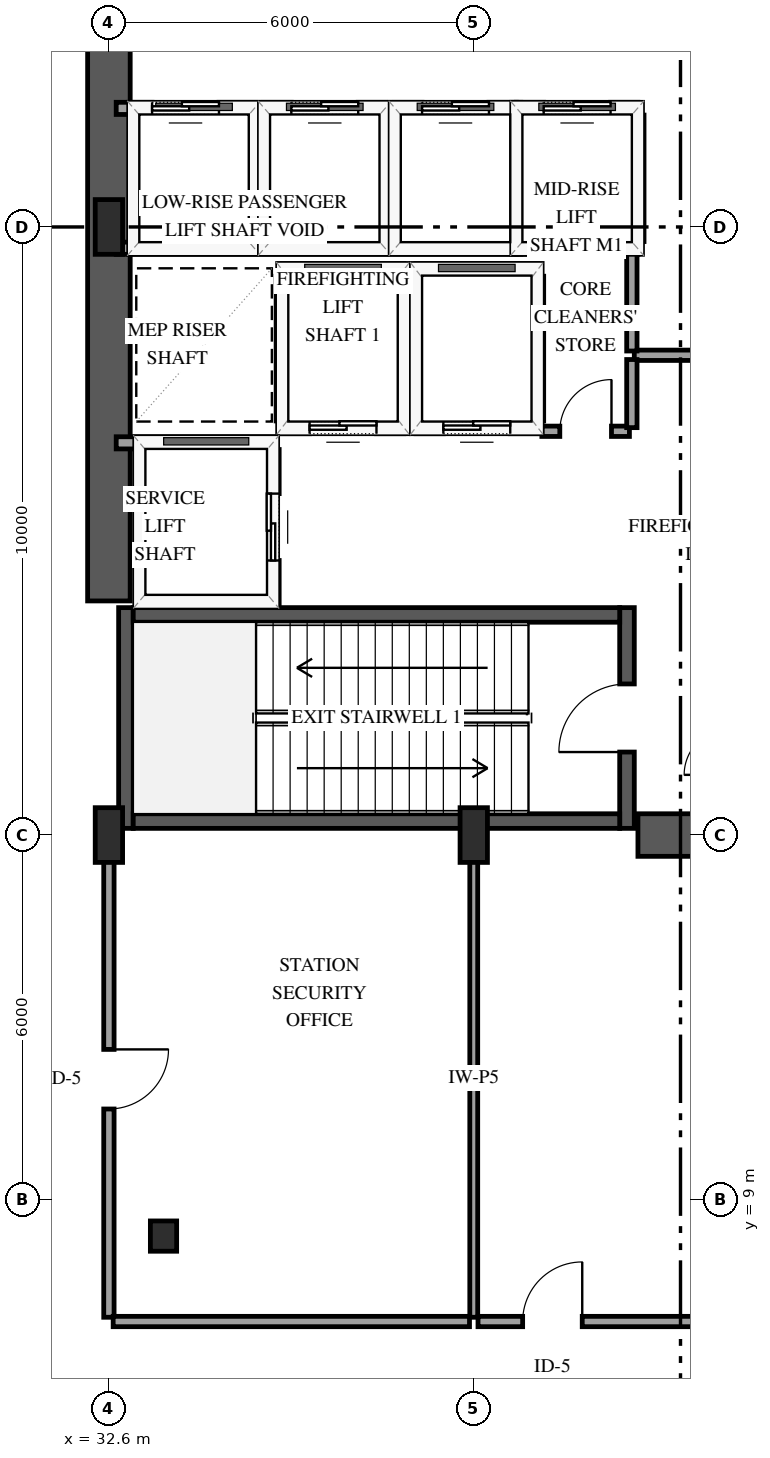
"""IFC4 building model, lengths in metres.
Left out: names, types, materials, properties, quantities, classifications, styles, units other than length and angle.
Written with IfcOpenShell. Run it as: python <this file> out.ifc"""

import sys

from ifc_helpers import new_model, si_unit, direction, frame, frame_2d, origin, origin_2d, place, context, subcontext, project, spatial, rectangle, i_section, extrude, element, fill, save


model = new_model("IFC4")
c1 = context("Model", 3, precision=1e-05, world=origin(), true_north=direction((0.0, 1.0)))
c2 = subcontext(c1, "Body", "Model", "MODEL_VIEW")
j1 = project(units=[si_unit("LENGTHUNIT", "METRE"), si_unit("PLANEANGLEUNIT", "RADIAN")], contexts=[c1])
p1 = place(None, origin())
s1 = spatial("IfcSite", under=j1, at=p1, CompositionType="ELEMENT")
p2 = place(p1, origin())
s2 = spatial("IfcBuilding", under=s1, at=p2, CompositionType="ELEMENT")
p3 = place(p2, origin())
s3 = spatial("IfcBuildingStorey", under=s2, at=p3, CompositionType="ELEMENT", Elevation=0.0)
p4 = place(p3, frame((32.88, 15.11, 0.0), z_axis=(0.0, 0.0, 1.0), x_axis=(0.0, 1.0, 0.0)))
e1 = element("IfcWall", 1, at=p4, inside=s3, PredefinedType="SHEAR", context=c2, shape_type="SweptSolid", body=[
    extrude(rectangle(XDim=3.63, YDim=0.24, at=frame_2d((1.815, 0.0))), origin(), (0.0, 0.0, 1.0), 6.0),
])
p5 = place(p3, frame((41.12, 15.11, 0.0), z_axis=(0.0, 0.0, 1.0), x_axis=(0.0, 1.0, 0.0)))
e2 = element("IfcWall", 2, at=p5, inside=s3, PredefinedType="SHEAR", context=c2, shape_type="SweptSolid", body=[
    extrude(rectangle(XDim=3.63, YDim=0.24, at=frame_2d((1.815, 0.0))), origin(), (0.0, 0.0, 1.0), 6.0),
])
p6 = place(p5, frame((1.255, 0.0, 0.0)))
e3 = element("IfcOpeningElement", 3, at=p6, cuts=e2, PredefinedType="OPENING", context=c2, shape_type="SweptSolid", body=[
    extrude(rectangle(XDim=1.12, YDim=2.15, at=frame_2d((0.56, 1.075))), frame((0.0, 0.13, 0.0), z_axis=(0.0, -1.0, 0.0), x_axis=(1.0, 0.0, 0.0)), (0.0, 0.0, 1.0), 0.26),
])
for number, where, z_axis, x_axis in (
    (4, (33.0, 15.23, 0.0), (0.0, 0.0, 1.0), (1.0, 0.0, 0.0)),
    (5, (33.0, 18.62, 0.0), (0.0, 0.0, 1.0), (1.0, 0.0, 0.0)),
):
    element("IfcWall", number, at=place(p3, frame(where, z_axis=z_axis, x_axis=x_axis)), inside=s3, PredefinedType="SHEAR", context=c2, shape_type="SweptSolid", body=[
        extrude(rectangle(XDim=8.0, YDim=0.24, at=frame_2d((4.0, 0.0))), origin(), (0.0, 0.0, 1.0), 6.0),
    ])
p7 = place(p3, frame((32.6, 18.85, 0.0), z_axis=(0.0, 0.0, 1.0), x_axis=(0.0, 1.0, 0.0)))
e6 = element("IfcWall", 6, at=p7, inside=s3, PredefinedType="SHEAR", context=c2, shape_type="SweptSolid", body=[
    extrude(rectangle(XDim=12.3, YDim=0.7, at=frame_2d((6.15, 0.0))), origin(), (0.0, 0.0, 1.0), 6.0),
])
p8 = place(p3, frame((41.3, 15.0, 0.0), z_axis=(0.0, 0.0, 1.0), x_axis=(1.0, 0.0, 0.0)))
e7 = element("IfcWall", 7, at=p8, inside=s3, PredefinedType="SHEAR", context=c2, shape_type="SweptSolid", body=[
    extrude(rectangle(XDim=2.85, YDim=0.7, at=frame_2d((1.425, 0.0))), origin(), (0.0, 0.0, 1.0), 6.0),
])
for number, where, z_axis, x_axis in (
    (8, (32.6, 15.0, 0.0), (0.0, 0.0, 1.0), (1.0, 0.0, 0.0)),
    (9, (32.6, 25.0, 0.0), (0.0, 0.0, 1.0), (1.0, 0.0, 0.0)),
    (10, (38.6, 15.0, 0.0), (0.0, 0.0, 1.0), (1.0, 0.0, 0.0)),
):
    element("IfcColumn", number, at=place(p3, frame(where, z_axis=z_axis, x_axis=x_axis)), inside=s3, PredefinedType="PILASTER", context=c2, shape_type="SweptSolid", body=[
        extrude(rectangle(XDim=0.45, YDim=0.9, at=origin_2d()), origin(), (0.0, 0.0, 1.0), 6.0),
    ])
p9 = place(p3, frame((33.498, 8.405, 0.0), z_axis=(0.0, 0.0, 1.0), x_axis=(1.0, 0.0, 0.0)))
e11 = element("IfcColumn", 11, at=p9, inside=s3, PredefinedType="COLUMN", context=c2, shape_type="SweptSolid", body=[
    extrude(i_section(OverallWidth=0.432, OverallDepth=0.498, WebThickness=0.056, FlangeThickness=0.089, FilletRadius=0.038, at=origin_2d()), origin(), (0.0, 0.0, 1.0), 6.0),
])
p10 = place(p3, frame((35.45, 21.7, 0.0), z_axis=(0.0, 0.0, 1.0), x_axis=(1.0, 0.0, 0.0)))
e12 = element("IfcWall", 12, at=p10, inside=s3, PredefinedType="SOLIDWALL", context=c2, shape_type="SweptSolid", body=[
    extrude(rectangle(XDim=2.0, YDim=0.2, at=frame_2d((1.0, 0.0))), origin(), (0.0, 0.0, 1.0), 5.68),
])
p11 = place(p10, frame((0.45, 0.0, 0.0)))
e13 = element("IfcOpeningElement", 13, at=p11, cuts=e12, PredefinedType="OPENING", context=c2, shape_type="SweptSolid", body=[
    extrude(rectangle(XDim=1.1, YDim=2.15, at=frame_2d((0.55, 1.075))), frame((0.0, 0.11, 0.0), z_axis=(0.0, -1.0, 0.0), x_axis=(1.0, 0.0, 0.0)), (0.0, 0.0, 1.0), 0.22),
])
p12 = place(p3, frame((35.45, 24.3, 0.0), z_axis=(0.0, 0.0, 1.0), x_axis=(1.0, 0.0, 0.0)))
e14 = element("IfcWall", 14, at=p12, inside=s3, PredefinedType="SOLIDWALL", context=c2, shape_type="SweptSolid", body=[
    extrude(rectangle(XDim=2.0, YDim=0.2, at=frame_2d((1.0, 0.0))), origin(), (0.0, 0.0, 1.0), 5.68),
])
for number, where, z_axis, x_axis in (
    (15, (35.45, 21.81, 0.0), (0.0, 0.0, 1.0), (0.0, 1.0, 0.0)),
    (16, (37.45, 21.81, 0.0), (0.0, 0.0, 1.0), (0.0, 1.0, 0.0)),
):
    element("IfcWall", number, at=place(p3, frame(where, z_axis=z_axis, x_axis=x_axis)), inside=s3, PredefinedType="SOLIDWALL", context=c2, shape_type="SweptSolid", body=[
        extrude(rectangle(XDim=2.38, YDim=0.2, at=frame_2d((1.19, 0.0))), origin(), (0.0, 0.0, 1.0), 5.68),
    ])
p13 = place(p3, frame((37.65, 21.7, 0.0), z_axis=(0.0, 0.0, 1.0), x_axis=(1.0, 0.0, 0.0)))
e17 = element("IfcWall", 17, at=p13, inside=s3, PredefinedType="SOLIDWALL", context=c2, shape_type="SweptSolid", body=[
    extrude(rectangle(XDim=2.0, YDim=0.2, at=frame_2d((1.0, 0.0))), origin(), (0.0, 0.0, 1.0), 5.68),
])
p14 = place(p13, frame((0.45, 0.0, 0.0)))
e18 = element("IfcOpeningElement", 18, at=p14, cuts=e17, PredefinedType="OPENING", context=c2, shape_type="SweptSolid", body=[
    extrude(rectangle(XDim=1.1, YDim=2.15, at=frame_2d((0.55, 1.075))), frame((0.0, 0.11, 0.0), z_axis=(0.0, -1.0, 0.0), x_axis=(1.0, 0.0, 0.0)), (0.0, 0.0, 1.0), 0.22),
])
p15 = place(p3, frame((37.65, 24.3, 0.0), z_axis=(0.0, 0.0, 1.0), x_axis=(1.0, 0.0, 0.0)))
e19 = element("IfcWall", 19, at=p15, inside=s3, PredefinedType="SOLIDWALL", context=c2, shape_type="SweptSolid", body=[
    extrude(rectangle(XDim=2.0, YDim=0.2, at=frame_2d((1.0, 0.0))), origin(), (0.0, 0.0, 1.0), 5.68),
])
p16 = place(p3, frame((39.65, 21.81, 0.0), z_axis=(0.0, 0.0, 1.0), x_axis=(0.0, 1.0, 0.0)))
e20 = element("IfcWall", 20, at=p16, inside=s3, PredefinedType="SOLIDWALL", context=c2, shape_type="SweptSolid", body=[
    extrude(rectangle(XDim=2.38, YDim=0.2, at=frame_2d((1.19, 0.0))), origin(), (0.0, 0.0, 1.0), 5.68),
])
p17 = place(p3, frame((32.72, 21.45, 0.0), z_axis=(0.0, 0.0, 1.0), x_axis=(1.0, 0.0, 0.0)))
e21 = element("IfcWall", 21, at=p17, inside=s3, PredefinedType="SOLIDWALL", context=c2, shape_type="SweptSolid", body=[
    extrude(rectangle(XDim=2.58, YDim=0.2, at=frame_2d((1.29, 0.0))), origin(), (0.0, 0.0, 1.0), 5.68),
])
p18 = place(p3, frame((35.3, 18.79, 0.0), z_axis=(0.0, 0.0, 1.0), x_axis=(0.0, 1.0, 0.0)))
e22 = element("IfcWall", 22, at=p18, inside=s3, PredefinedType="SOLIDWALL", context=c2, shape_type="SweptSolid", body=[
    extrude(rectangle(XDim=2.55, YDim=0.2, at=frame_2d((1.275, 0.0))), origin(), (0.0, 0.0, 1.0), 5.68),
])
p19 = place(p18, frame((0.725, 0.0, 0.0)))
e23 = element("IfcOpeningElement", 23, at=p19, cuts=e22, PredefinedType="OPENING", context=c2, shape_type="SweptSolid", body=[
    extrude(rectangle(XDim=1.1, YDim=2.15, at=frame_2d((0.55, 1.075))), frame((0.0, 0.11, 0.0), z_axis=(0.0, -1.0, 0.0), x_axis=(1.0, 0.0, 0.0)), (0.0, 0.0, 1.0), 0.22),
])
p20 = place(p3, frame((32.72, 24.65, 0.0), z_axis=(0.0, 0.0, 1.0), x_axis=(1.0, 0.0, 0.0)))
e24 = element("IfcWall", 24, at=p20, inside=s3, PredefinedType="SOLIDWALL", context=c2, shape_type="SweptSolid", body=[
    extrude(rectangle(XDim=2.28, YDim=0.2, at=frame_2d((1.14, 0.0))), origin(), (0.0, 0.0, 1.0), 5.68),
])
p21 = place(p3, frame((32.72, 26.95, 0.0), z_axis=(0.0, 0.0, 1.0), x_axis=(1.0, 0.0, 0.0)))
e25 = element("IfcWall", 25, at=p21, inside=s3, PredefinedType="SOLIDWALL", context=c2, shape_type="SweptSolid", body=[
    extrude(rectangle(XDim=2.28, YDim=0.2, at=frame_2d((1.14, 0.0))), origin(), (0.0, 0.0, 1.0), 5.68),
])
p22 = place(p21, frame((0.59, 0.0, 0.0)))
e26 = element("IfcOpeningElement", 26, at=p22, cuts=e25, PredefinedType="OPENING", context=c2, shape_type="SweptSolid", body=[
    extrude(rectangle(XDim=1.1, YDim=2.15, at=frame_2d((0.55, 1.075))), frame((0.0, 0.11, 0.0), z_axis=(0.0, -1.0, 0.0), x_axis=(1.0, 0.0, 0.0)), (0.0, 0.0, 1.0), 0.22),
])
p23 = place(p3, frame((35.0, 24.76, 0.0), z_axis=(0.0, 0.0, 1.0), x_axis=(0.0, 1.0, 0.0)))
e27 = element("IfcWall", 27, at=p23, inside=s3, PredefinedType="SOLIDWALL", context=c2, shape_type="SweptSolid", body=[
    extrude(rectangle(XDim=2.08, YDim=0.2, at=frame_2d((1.04, 0.0))), origin(), (0.0, 0.0, 1.0), 5.68),
])
p24 = place(p3, frame((35.15, 24.65, 0.0), z_axis=(0.0, 0.0, 1.0), x_axis=(1.0, 0.0, 0.0)))
e28 = element("IfcWall", 28, at=p24, inside=s3, PredefinedType="SOLIDWALL", context=c2, shape_type="SweptSolid", body=[
    extrude(rectangle(XDim=2.0, YDim=0.2, at=frame_2d((1.0, 0.0))), origin(), (0.0, 0.0, 1.0), 5.68),
])
p25 = place(p3, frame((35.15, 26.95, 0.0), z_axis=(0.0, 0.0, 1.0), x_axis=(1.0, 0.0, 0.0)))
e29 = element("IfcWall", 29, at=p25, inside=s3, PredefinedType="SOLIDWALL", context=c2, shape_type="SweptSolid", body=[
    extrude(rectangle(XDim=2.0, YDim=0.2, at=frame_2d((1.0, 0.0))), origin(), (0.0, 0.0, 1.0), 5.68),
])
p26 = place(p25, frame((0.45, 0.0, 0.0)))
e30 = element("IfcOpeningElement", 30, at=p26, cuts=e29, PredefinedType="OPENING", context=c2, shape_type="SweptSolid", body=[
    extrude(rectangle(XDim=1.1, YDim=2.15, at=frame_2d((0.55, 1.075))), frame((0.0, 0.11, 0.0), z_axis=(0.0, -1.0, 0.0), x_axis=(1.0, 0.0, 0.0)), (0.0, 0.0, 1.0), 0.22),
])
p27 = place(p3, frame((37.15, 24.76, 0.0), z_axis=(0.0, 0.0, 1.0), x_axis=(0.0, 1.0, 0.0)))
e31 = element("IfcWall", 31, at=p27, inside=s3, PredefinedType="SOLIDWALL", context=c2, shape_type="SweptSolid", body=[
    extrude(rectangle(XDim=2.08, YDim=0.2, at=frame_2d((1.04, 0.0))), origin(), (0.0, 0.0, 1.0), 5.68),
])
p28 = place(p3, frame((37.3, 24.65, 0.0), z_axis=(0.0, 0.0, 1.0), x_axis=(1.0, 0.0, 0.0)))
e32 = element("IfcWall", 32, at=p28, inside=s3, PredefinedType="SOLIDWALL", context=c2, shape_type="SweptSolid", body=[
    extrude(rectangle(XDim=2.0, YDim=0.2, at=frame_2d((1.0, 0.0))), origin(), (0.0, 0.0, 1.0), 5.68),
])
p29 = place(p3, frame((37.3, 26.95, 0.0), z_axis=(0.0, 0.0, 1.0), x_axis=(1.0, 0.0, 0.0)))
e33 = element("IfcWall", 33, at=p29, inside=s3, PredefinedType="SOLIDWALL", context=c2, shape_type="SweptSolid", body=[
    extrude(rectangle(XDim=2.0, YDim=0.2, at=frame_2d((1.0, 0.0))), origin(), (0.0, 0.0, 1.0), 5.68),
])
p30 = place(p29, frame((0.45, 0.0, 0.0)))
e34 = element("IfcOpeningElement", 34, at=p30, cuts=e33, PredefinedType="OPENING", context=c2, shape_type="SweptSolid", body=[
    extrude(rectangle(XDim=1.1, YDim=2.15, at=frame_2d((0.55, 1.075))), frame((0.0, 0.11, 0.0), z_axis=(0.0, -1.0, 0.0), x_axis=(1.0, 0.0, 0.0)), (0.0, 0.0, 1.0), 0.22),
])
p31 = place(p3, frame((39.3, 24.76, 0.0), z_axis=(0.0, 0.0, 1.0), x_axis=(0.0, 1.0, 0.0)))
e35 = element("IfcWall", 35, at=p31, inside=s3, PredefinedType="SOLIDWALL", context=c2, shape_type="SweptSolid", body=[
    extrude(rectangle(XDim=2.08, YDim=0.2, at=frame_2d((1.04, 0.0))), origin(), (0.0, 0.0, 1.0), 5.68),
])
p32 = place(p3, frame((39.3, 24.65, 0.0), z_axis=(0.0, 0.0, 1.0), x_axis=(1.0, 0.0, 0.0)))
e36 = element("IfcWall", 36, at=p32, inside=s3, PredefinedType="SOLIDWALL", context=c2, shape_type="SweptSolid", body=[
    extrude(rectangle(XDim=2.0, YDim=0.2, at=frame_2d((1.0, 0.0))), origin(), (0.0, 0.0, 1.0), 5.68),
])
p33 = place(p3, frame((39.3, 26.95, 0.0), z_axis=(0.0, 0.0, 1.0), x_axis=(1.0, 0.0, 0.0)))
e37 = element("IfcWall", 37, at=p33, inside=s3, PredefinedType="SOLIDWALL", context=c2, shape_type="SweptSolid", body=[
    extrude(rectangle(XDim=2.0, YDim=0.2, at=frame_2d((1.0, 0.0))), origin(), (0.0, 0.0, 1.0), 5.68),
])
p34 = place(p33, frame((0.45, 0.0, 0.0)))
e38 = element("IfcOpeningElement", 38, at=p34, cuts=e37, PredefinedType="OPENING", context=c2, shape_type="SweptSolid", body=[
    extrude(rectangle(XDim=1.1, YDim=2.15, at=frame_2d((0.55, 1.075))), frame((0.0, 0.11, 0.0), z_axis=(0.0, -1.0, 0.0), x_axis=(1.0, 0.0, 0.0)), (0.0, 0.0, 1.0), 0.22),
])
p35 = place(p3, frame((41.3, 24.76, 0.0), z_axis=(0.0, 0.0, 1.0), x_axis=(0.0, 1.0, 0.0)))
e39 = element("IfcWall", 39, at=p35, inside=s3, PredefinedType="SOLIDWALL", context=c2, shape_type="SweptSolid", body=[
    extrude(rectangle(XDim=2.08, YDim=0.2, at=frame_2d((1.04, 0.0))), origin(), (0.0, 0.0, 1.0), 5.68),
])
p36 = place(p3, frame((38.67, 7.0, 0.0), z_axis=(0.0, 0.0, 1.0), x_axis=(1.0, 0.0, 0.0)))
e40 = element("IfcWall", 40, at=p36, inside=s3, PredefinedType="PARTITIONING", context=c2, shape_type="SweptSolid", body=[
    extrude(rectangle(XDim=8.06, YDim=0.17, at=frame_2d((4.03, 0.0))), origin(), (0.0, 0.0, 1.0), 5.68),
])
p37 = place(p36, frame((0.734, 0.0, 0.0)))
e41 = element("IfcOpeningElement", 41, at=p37, cuts=e40, PredefinedType="OPENING", context=c2, shape_type="SweptSolid", body=[
    extrude(rectangle(XDim=0.98, YDim=2.15, at=frame_2d((0.49, 1.075))), frame((0.0, 0.095, 0.0), z_axis=(0.0, -1.0, 0.0), x_axis=(1.0, 0.0, 0.0)), (0.0, 0.0, 1.0), 0.19),
])
p38 = place(p3, frame((32.6, 14.93, 0.0), z_axis=(0.0, 0.0, 1.0), x_axis=(0.0, -1.0, 0.0)))
e42 = element("IfcWall", 42, at=p38, inside=s3, PredefinedType="PARTITIONING", context=c2, shape_type="SweptSolid", body=[
    extrude(rectangle(XDim=7.86, YDim=0.17, at=frame_2d((3.93, 0.0))), origin(), (0.0, 0.0, 1.0), 4.802),
])
p39 = place(p38, frame((3.455, 0.0, 0.0)))
e43 = element("IfcOpeningElement", 43, at=p39, cuts=e42, PredefinedType="OPENING", context=c2, shape_type="SweptSolid", body=[
    extrude(rectangle(XDim=0.98, YDim=2.15, at=frame_2d((0.49, 1.075))), frame((0.0, 0.095, 0.0), z_axis=(0.0, -1.0, 0.0), x_axis=(1.0, 0.0, 0.0)), (0.0, 0.0, 1.0), 0.19),
])
p40 = place(p3, frame((38.6, 7.07, 0.0), z_axis=(0.0, 0.0, 1.0), x_axis=(0.0, 1.0, 0.0)))
e44 = element("IfcWall", 44, at=p40, inside=s3, PredefinedType="PARTITIONING", context=c2, shape_type="SweptSolid", body=[
    extrude(rectangle(XDim=7.86, YDim=0.13, at=frame_2d((3.93, 0.0))), origin(), (0.0, 0.0, 1.0), 5.68),
])
p41 = place(p3, frame((32.67, 7.0, 0.0), z_axis=(0.0, 0.0, 1.0), x_axis=(1.0, 0.0, 0.0)))
e45 = element("IfcWall", 45, at=p41, inside=s3, PredefinedType="PARTITIONING", context=c2, shape_type="SweptSolid", body=[
    extrude(rectangle(XDim=5.86, YDim=0.17, at=frame_2d((2.93, 0.0))), origin(), (0.0, 0.0, 1.0), 5.68),
])
p42 = place(p3, frame((41.24, 22.89, 0.0), z_axis=(0.0, 0.0, 1.0), x_axis=(1.0, 0.0, 0.0)))
e46 = element("IfcWall", 46, at=p42, inside=s3, PredefinedType="PARTITIONING", context=c2, shape_type="SweptSolid", body=[
    extrude(rectangle(XDim=3.32, YDim=0.17, at=frame_2d((1.66, 0.0))), origin(), (0.0, 0.0, 1.0), 5.68),
])
p43 = place(p42, frame((1.12, 0.0, 0.0)))
e47 = element("IfcOpeningElement", 47, at=p43, cuts=e46, PredefinedType="OPENING", context=c2, shape_type="SweptSolid", body=[
    extrude(rectangle(XDim=1.08, YDim=2.15, at=frame_2d((0.54, 1.075))), frame((0.0, 0.095, 0.0), z_axis=(0.0, -1.0, 0.0), x_axis=(1.0, 0.0, 0.0)), (0.0, 0.0, 1.0), 0.19),
])
p44 = place(p3, frame((41.2, 22.96, 0.0), z_axis=(0.0, 0.0, 1.0), x_axis=(0.0, 1.0, 0.0)))
e48 = element("IfcWall", 48, at=p44, inside=s3, PredefinedType="PARTITIONING", context=c2, shape_type="SweptSolid", body=[
    extrude(rectangle(XDim=1.69, YDim=0.17, at=frame_2d((0.845, 0.0))), origin(), (0.0, 0.0, 1.0), 5.68),
])
p45 = place(p3, frame((39.72, 21.64, 0.0), z_axis=(0.0, 0.0, 1.0), x_axis=(1.0, 0.0, 0.0)))
e49 = element("IfcWall", 49, at=p45, inside=s3, PredefinedType="PARTITIONING", context=c2, shape_type="SweptSolid", body=[
    extrude(rectangle(XDim=1.44, YDim=0.17, at=frame_2d((0.72, 0.0))), origin(), (0.0, 0.0, 1.0), 5.68),
])
p46 = place(p45, frame((0.295, 0.0, 0.0)))
e50 = element("IfcOpeningElement", 50, at=p46, cuts=e49, PredefinedType="OPENING", context=c2, shape_type="SweptSolid", body=[
    extrude(rectangle(XDim=0.85, YDim=2.1, at=frame_2d((0.425, 1.05))), frame((0.0, 0.095, 0.0), z_axis=(0.0, -1.0, 0.0), x_axis=(1.0, 0.0, 0.0)), (0.0, 0.0, 1.0), 0.19),
])
p47 = place(p3, frame((41.2, 21.7, 0.0), z_axis=(0.0, 0.0, 1.0), x_axis=(0.0, 1.0, 0.0)))
e51 = element("IfcWall", 51, at=p47, inside=s3, PredefinedType="PARTITIONING", context=c2, shape_type="SweptSolid", body=[
    extrude(rectangle(XDim=1.12, YDim=0.17, at=frame_2d((0.56, 0.0))), origin(), (0.0, 0.0, 1.0), 5.68),
])
p48 = place(p11, origin())
e52 = element("IfcDoor", 52, at=p48, inside=s3, OperationType="SLIDING_TO_LEFT", PredefinedType="DOOR", context=c2, shape_type="SweptSolid", body=[
    extrude(rectangle(XDim=1.1, YDim=2.15, at=frame_2d((0.55, 1.075))), frame((0.0, 0.025, 0.0), z_axis=(0.0, -1.0, 0.0), x_axis=(1.0, 0.0, 0.0)), (0.0, 0.0, 1.0), 0.05),
])
fill(e13, e52)
p49 = place(p14, origin())
e53 = element("IfcDoor", 53, at=p49, inside=s3, OperationType="SLIDING_TO_LEFT", PredefinedType="DOOR", context=c2, shape_type="SweptSolid", body=[
    extrude(rectangle(XDim=1.1, YDim=2.15, at=frame_2d((0.55, 1.075))), frame((0.0, 0.025, 0.0), z_axis=(0.0, -1.0, 0.0), x_axis=(1.0, 0.0, 0.0)), (0.0, 0.0, 1.0), 0.05),
])
fill(e18, e53)
p50 = place(p19, origin())
e54 = element("IfcDoor", 54, at=p50, inside=s3, OperationType="SLIDING_TO_LEFT", PredefinedType="DOOR", context=c2, shape_type="SweptSolid", body=[
    extrude(rectangle(XDim=1.1, YDim=2.15, at=frame_2d((0.55, 1.075))), frame((0.0, 0.025, 0.0), z_axis=(0.0, -1.0, 0.0), x_axis=(1.0, 0.0, 0.0)), (0.0, 0.0, 1.0), 0.05),
])
fill(e23, e54)
p51 = place(p22, origin())
e55 = element("IfcDoor", 55, at=p51, inside=s3, OperationType="SLIDING_TO_LEFT", PredefinedType="DOOR", context=c2, shape_type="SweptSolid", body=[
    extrude(rectangle(XDim=1.1, YDim=2.15, at=frame_2d((0.55, 1.075))), frame((0.0, 0.025, 0.0), z_axis=(0.0, -1.0, 0.0), x_axis=(1.0, 0.0, 0.0)), (0.0, 0.0, 1.0), 0.05),
])
fill(e26, e55)
p52 = place(p26, origin())
e56 = element("IfcDoor", 56, at=p52, inside=s3, OperationType="SLIDING_TO_LEFT", PredefinedType="DOOR", context=c2, shape_type="SweptSolid", body=[
    extrude(rectangle(XDim=1.1, YDim=2.15, at=frame_2d((0.55, 1.075))), frame((0.0, 0.025, 0.0), z_axis=(0.0, -1.0, 0.0), x_axis=(1.0, 0.0, 0.0)), (0.0, 0.0, 1.0), 0.05),
])
fill(e30, e56)
p53 = place(p30, origin())
e57 = element("IfcDoor", 57, at=p53, inside=s3, OperationType="SLIDING_TO_LEFT", PredefinedType="DOOR", context=c2, shape_type="SweptSolid", body=[
    extrude(rectangle(XDim=1.1, YDim=2.15, at=frame_2d((0.55, 1.075))), frame((0.0, 0.025, 0.0), z_axis=(0.0, -1.0, 0.0), x_axis=(1.0, 0.0, 0.0)), (0.0, 0.0, 1.0), 0.05),
])
fill(e34, e57)
p54 = place(p34, origin())
e58 = element("IfcDoor", 58, at=p54, inside=s3, OperationType="SLIDING_TO_LEFT", PredefinedType="DOOR", context=c2, shape_type="SweptSolid", body=[
    extrude(rectangle(XDim=1.1, YDim=2.15, at=frame_2d((0.55, 1.075))), frame((0.0, 0.025, 0.0), z_axis=(0.0, -1.0, 0.0), x_axis=(1.0, 0.0, 0.0)), (0.0, 0.0, 1.0), 0.05),
])
fill(e38, e58)
p55 = place(p6, origin())
e59 = element("IfcDoor", 59, at=p55, inside=s3, OperationType="SINGLE_SWING_LEFT", PredefinedType="DOOR", context=c2, shape_type="SweptSolid", body=[
    extrude(rectangle(XDim=1.12, YDim=2.15, at=frame_2d((0.56, 1.075))), frame((0.0, 0.025, 0.0), z_axis=(0.0, -1.0, 0.0), x_axis=(1.0, 0.0, 0.0)), (0.0, 0.0, 1.0), 0.05),
])
fill(e3, e59)
p56 = place(p37, origin())
e60 = element("IfcDoor", 60, at=p56, inside=s3, OperationType="SINGLE_SWING_RIGHT", PredefinedType="DOOR", context=c2, shape_type="SweptSolid", body=[
    extrude(rectangle(XDim=0.98, YDim=2.15, at=frame_2d((0.49, 1.075))), frame((0.0, 0.025, 0.0), z_axis=(0.0, -1.0, 0.0), x_axis=(1.0, 0.0, 0.0)), (0.0, 0.0, 1.0), 0.05),
])
fill(e41, e60)
p57 = place(p39, origin())
e61 = element("IfcDoor", 61, at=p57, inside=s3, OperationType="SINGLE_SWING_LEFT", PredefinedType="DOOR", context=c2, shape_type="SweptSolid", body=[
    extrude(rectangle(XDim=0.98, YDim=2.15, at=frame_2d((0.49, 1.075))), frame((0.0, 0.025, 0.0), z_axis=(0.0, -1.0, 0.0), x_axis=(1.0, 0.0, 0.0)), (0.0, 0.0, 1.0), 0.05),
])
fill(e43, e61)
p58 = place(p46, origin())
e62 = element("IfcDoor", 62, at=p58, inside=s3, OperationType="SINGLE_SWING_RIGHT", PredefinedType="DOOR", context=c2, shape_type="SweptSolid", body=[
    extrude(rectangle(XDim=0.85, YDim=2.1, at=frame_2d((0.425, 1.05))), frame((0.0, 0.025, 0.0), z_axis=(0.0, -1.0, 0.0), x_axis=(1.0, 0.0, 0.0)), (0.0, 0.0, 1.0), 0.05),
])
fill(e50, e62)
save(model, sys.argv[1])
